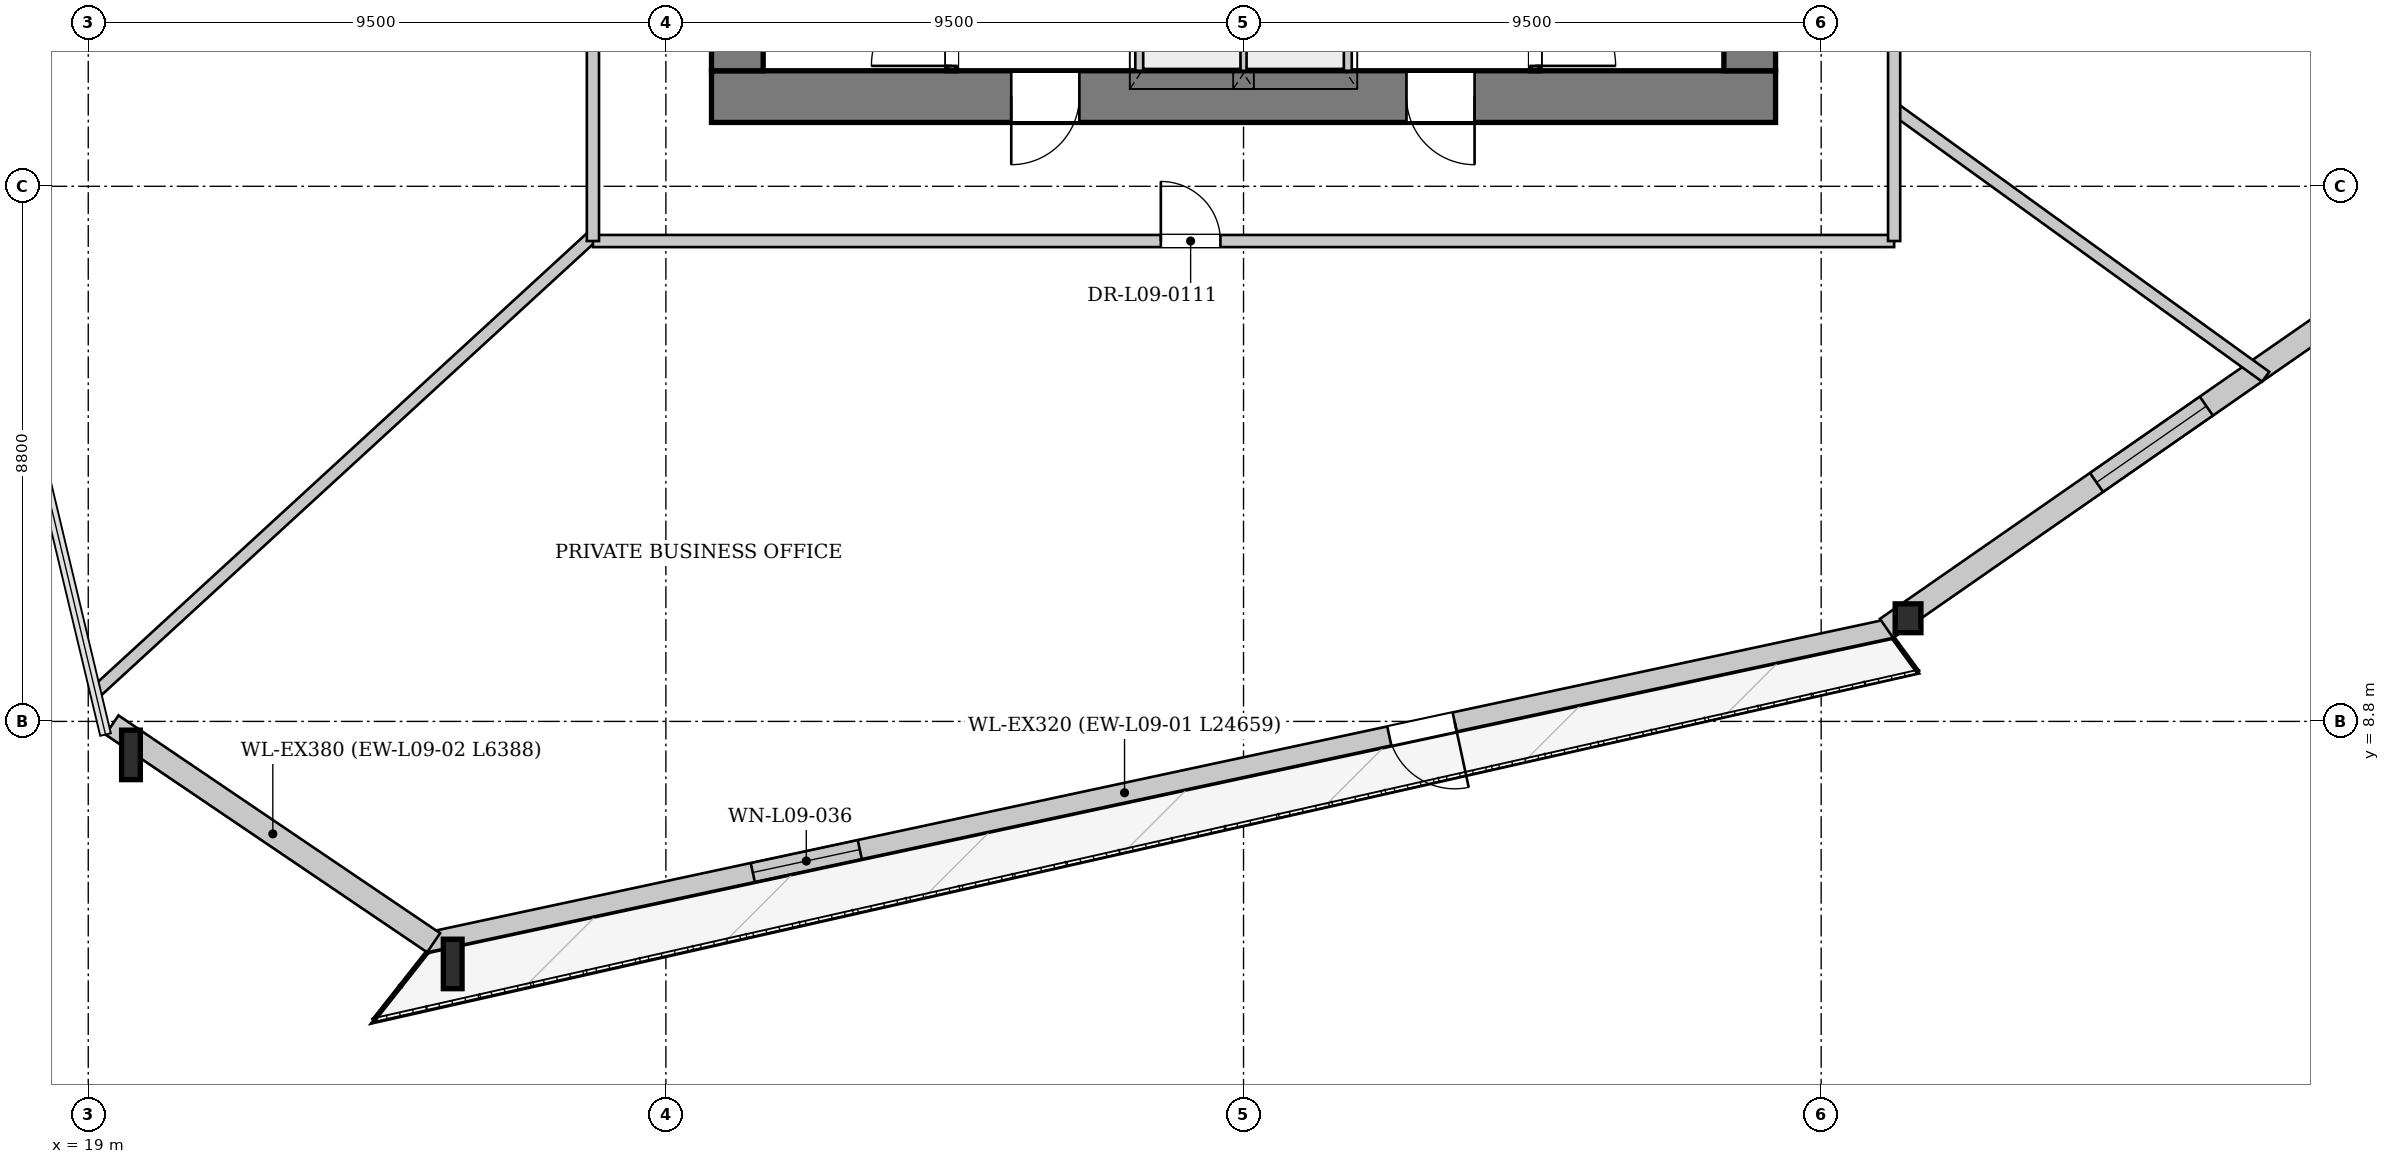
"""IFC4 building model, lengths in metres.
Left out: names, types, materials, properties, quantities, classifications, styles, units other than length and angle.
Written with IfcOpenShell. Run it as: python <this file> out.ifc"""

import sys

from ifc_helpers import new_model, si_unit, direction, frame, frame_2d, origin, origin_2d, place, context, subcontext, project, spatial, rectangle, i_section, extrude, source, transform, mapped, element, fill, save


model = new_model("IFC4")
c1 = context("Model", 3, precision=1e-05, world=origin(), true_north=direction((0.0, 1.0)))
c2 = subcontext(c1, "Body", "Model", "MODEL_VIEW")
j1 = project(units=[si_unit("LENGTHUNIT", "METRE"), si_unit("PLANEANGLEUNIT", "RADIAN")], contexts=[c1])
p1 = place(None, origin())
s1 = spatial("IfcSite", under=j1, at=p1, CompositionType="ELEMENT")
p2 = place(p1, origin())
s2 = spatial("IfcBuilding", under=s1, at=p2, CompositionType="ELEMENT")
p3 = place(p2, frame((0.0, 0.0, 39.95)))
s3 = spatial("IfcBuildingStorey", under=s2, at=p3, CompositionType="ELEMENT", Elevation=39.95)
m1 = source(origin(), c2, "Body", "SweptSolid", [
    extrude(i_section(OverallWidth=0.308, OverallDepth=0.814, WebThickness=0.021, FlangeThickness=0.04, at=origin_2d()), origin(), (0.0, 0.0, 1.0), 3.551),
])
p4 = place(p3, frame((19.284, 8.584, 0.0), z_axis=(0.235644751248, -0.188543305492, 0.953374518835), x_axis=(0.624750617891, 0.780824349931, 0.0)))
e1 = element("IfcColumn", 1, at=p4, inside=s3, PredefinedType="COLUMN", context=c2, shape_type="MappedRepresentation", body=[
    mapped(m1, transform((0.0, 0.0, 0.0), x_axis=(1.0, 0.0, 0.0), y_axis=(0.0, 1.0, 0.0), z_axis=(0.0, 0.0, 1.0), scale=1.0)),
])
m2 = source(origin(), c2, "Body", "SweptSolid", [
    extrude(i_section(OverallWidth=0.308, OverallDepth=0.814, WebThickness=0.021, FlangeThickness=0.04, at=origin_2d()), origin(), (0.0, 0.0, 1.0), 3.509),
])
p5 = place(p3, frame((24.574, 5.003, 0.0), z_axis=(0.239435581486, -0.109036778898, 0.964770222989), x_axis=(0.414440493718, 0.910076412817, 0.0)))
e2 = element("IfcColumn", 2, at=p5, inside=s3, PredefinedType="COLUMN", context=c2, shape_type="MappedRepresentation", body=[
    mapped(m2, transform((0.0, 0.0, 0.0), x_axis=(1.0, 0.0, 0.0), y_axis=(0.0, 1.0, 0.0), z_axis=(0.0, 0.0, 1.0), scale=1.0)),
])
m3 = source(origin(), c2, "Body", "SweptSolid", [
    extrude(i_section(OverallWidth=0.424, OverallDepth=0.474, WebThickness=0.043, FlangeThickness=0.068, at=origin_2d()), origin(), (0.0, 0.0, 1.0), 3.48),
])
p6 = place(p3, frame((48.684, 10.175, 0.0), z_axis=(0.140934148602, 0.184638466461, 0.972649064391), x_axis=(-0.79489758115, 0.60674363242, 0.0)))
e3 = element("IfcColumn", 3, at=p6, inside=s3, PredefinedType="COLUMN", context=c2, shape_type="MappedRepresentation", body=[
    mapped(m3, transform((0.0, 0.0, 0.0), x_axis=(1.0, 0.0, 0.0), y_axis=(0.0, 1.0, 0.0), z_axis=(0.0, 0.0, 1.0), scale=1.0)),
])
p7 = place(p3, frame((48.65, 10.331, 0.0), z_axis=(0.0, 0.0, 1.0), x_axis=(-0.977755300127, -0.209748833307, 0.0)))
e4 = element("IfcWall", 4, at=p7, inside=s3, PredefinedType="SOLIDWALL", context=c2, shape_type="SweptSolid", body=[
    extrude(rectangle(XDim=24.659, YDim=0.32, at=frame_2d((12.329, 0.0))), origin(), (0.0, 0.0, 1.0), 2.592),
])
p8 = place(p7, frame((7.341, 0.0, 0.0)))
e5 = element("IfcOpeningElement", 5, at=p8, cuts=e4, PredefinedType="OPENING", context=c2, shape_type="SweptSolid", body=[
    extrude(rectangle(XDim=1.1, YDim=2.3, at=frame_2d((0.55, 1.15))), frame((0.0, 0.17, 0.0), z_axis=(0.0, -1.0, 0.0), x_axis=(1.0, 0.0, 0.0)), (0.0, 0.0, 1.0), 0.34),
])
p9 = place(p7, frame((17.347, 0.0, 0.272)))
e6 = element("IfcOpeningElement", 6, at=p9, cuts=e4, PredefinedType="OPENING", context=c2, shape_type="SweptSolid", body=[
    extrude(rectangle(XDim=1.8, YDim=2.2, at=frame_2d((0.9, 1.1))), frame((0.0, 0.17, 0.0), z_axis=(0.0, -1.0, 0.0), x_axis=(1.0, 0.0, 0.0)), (0.0, 0.0, 1.0), 0.34),
])
p10 = place(p3, frame((24.68, 5.16, 0.0), z_axis=(0.0, 0.0, 1.0), x_axis=(-0.828077807829, 0.560613185878, 0.0)))
e7 = element("IfcWall", 7, at=p10, inside=s3, PredefinedType="SOLIDWALL", context=c2, shape_type="SweptSolid", body=[
    extrude(rectangle(XDim=6.388, YDim=0.38, at=frame_2d((3.194, 0.0))), origin(), (0.0, 0.0, 1.0), 2.592),
])
p11 = place(p3, frame((68.826, 24.401, 0.0), z_axis=(0.0, 0.0, 1.0), x_axis=(-0.821232588092, -0.570593582383, 0.0)))
e8 = element("IfcWall", 8, at=p11, inside=s3, PredefinedType="SOLIDWALL", context=c2, shape_type="SweptSolid", body=[
    extrude(rectangle(XDim=24.659, YDim=0.38, at=frame_2d((12.329, 0.0))), origin(), (0.0, 0.0, 1.0), 2.592),
])
p12 = place(p11, frame((5.804, 0.0, 0.222)))
e9 = element("IfcOpeningElement", 9, at=p12, cuts=e8, PredefinedType="OPENING", context=c2, shape_type="SweptSolid", body=[
    extrude(rectangle(XDim=2.2, YDim=2.25, at=frame_2d((1.1, 1.125))), frame((0.0, 0.2, 0.0), z_axis=(0.0, -1.0, 0.0), x_axis=(1.0, 0.0, 0.0)), (0.0, 0.0, 1.0), 0.4),
])
p13 = place(p11, frame((18.254, 0.0, 0.222)))
e10 = element("IfcOpeningElement", 10, at=p13, cuts=e8, PredefinedType="OPENING", context=c2, shape_type="SweptSolid", body=[
    extrude(rectangle(XDim=2.2, YDim=2.25, at=frame_2d((1.1, 1.125))), frame((0.0, 0.2, 0.0), z_axis=(0.0, -1.0, 0.0), x_axis=(1.0, 0.0, 0.0)), (0.0, 0.0, 1.0), 0.4),
])
p14 = place(p3, frame((46.75, 19.075, 0.0), z_axis=(0.0, 0.0, 1.0), x_axis=(-1.0, 0.0, 0.0)))
e11 = element("IfcWall", 11, at=p14, inside=s3, PredefinedType="SHEAR", context=c2, shape_type="SweptSolid", body=[
    extrude(rectangle(XDim=17.5, YDim=0.85, at=frame_2d((8.75, 0.0))), origin(), (0.0, 0.0, 1.0), 3.3),
])
p15 = place(p14, frame((4.95, 0.0, 0.0)))
e12 = element("IfcOpeningElement", 12, at=p15, cuts=e11, PredefinedType="OPENING", context=c2, shape_type="SweptSolid", body=[
    extrude(rectangle(XDim=1.12, YDim=2.25, at=frame_2d((0.56, 1.125))), frame((0.0, 0.435, 0.0), z_axis=(0.0, -1.0, 0.0), x_axis=(1.0, 0.0, 0.0)), (0.0, 0.0, 1.0), 0.87),
])
p16 = place(p14, frame((11.45, 0.0, 0.0)))
e13 = element("IfcOpeningElement", 13, at=p16, cuts=e11, PredefinedType="OPENING", context=c2, shape_type="SweptSolid", body=[
    extrude(rectangle(XDim=1.12, YDim=2.25, at=frame_2d((0.56, 1.125))), frame((0.0, 0.435, 0.0), z_axis=(0.0, -1.0, 0.0), x_axis=(1.0, 0.0, 0.0)), (0.0, 0.0, 1.0), 0.87),
])
p17 = place(p3, frame((29.675, 19.5, 0.0), z_axis=(0.0, 0.0, 1.0), x_axis=(0.0, 1.0, 0.0)))
e14 = element("IfcWall", 14, at=p17, inside=s3, PredefinedType="SHEAR", context=c2, shape_type="SweptSolid", body=[
    extrude(rectangle(XDim=14.2, YDim=0.85, at=frame_2d((7.1, 0.0))), origin(), (0.0, 0.0, 1.0), 3.3),
])
p18 = place(p17, frame((7.42, 0.0, 0.0)))
e15 = element("IfcOpeningElement", 15, at=p18, cuts=e14, PredefinedType="OPENING", context=c2, shape_type="SweptSolid", body=[
    extrude(rectangle(XDim=1.6, YDim=2.2, at=frame_2d((0.8, 1.1))), frame((0.0, 0.435, 0.0), z_axis=(0.0, -1.0, 0.0), x_axis=(1.0, 0.0, 0.0)), (0.0, 0.0, 1.0), 0.87),
])
p19 = place(p3, frame((46.325, 33.7, 0.0), z_axis=(0.0, 0.0, 1.0), x_axis=(0.0, -1.0, 0.0)))
e16 = element("IfcWall", 16, at=p19, inside=s3, PredefinedType="SHEAR", context=c2, shape_type="SweptSolid", body=[
    extrude(rectangle(XDim=14.2, YDim=0.85, at=frame_2d((7.1, 0.0))), origin(), (0.0, 0.0, 1.0), 3.3),
])
p20 = place(p19, frame((5.18, 0.0, 0.0)))
e17 = element("IfcOpeningElement", 17, at=p20, cuts=e16, PredefinedType="OPENING", context=c2, shape_type="SweptSolid", body=[
    extrude(rectangle(XDim=1.6, YDim=2.2, at=frame_2d((0.8, 1.1))), frame((0.0, 0.435, 0.0), z_axis=(0.0, -1.0, 0.0), x_axis=(1.0, 0.0, 0.0)), (0.0, 0.0, 1.0), 0.87),
])
p21 = place(p3, frame((33.2, 19.5, 0.0), z_axis=(0.0, 0.0, 1.0), x_axis=(0.0, 1.0, 0.0)))
e18 = element("IfcWall", 18, at=p21, inside=s3, PredefinedType="PARTITIONING", context=c2, shape_type="SweptSolid", body=[
    extrude(rectangle(XDim=7.46, YDim=0.16, at=frame_2d((3.73, 0.0))), origin(), (0.0, 0.0, 1.0), 3.3),
])
p22 = place(p21, frame((0.08, 0.0, 0.0)))
e19 = element("IfcOpeningElement", 19, at=p22, cuts=e18, PredefinedType="OPENING", context=c2, shape_type="SweptSolid", body=[
    extrude(rectangle(XDim=1.32, YDim=2.2, at=frame_2d((0.66, 1.1))), frame((0.0, 0.09, 0.0), z_axis=(0.0, -1.0, 0.0), x_axis=(1.0, 0.0, 0.0)), (0.0, 0.0, 1.0), 0.18),
])
p23 = place(p3, frame((42.8, 26.96, 0.0), z_axis=(0.0, 0.0, 1.0), x_axis=(0.0, -1.0, 0.0)))
e20 = element("IfcWall", 20, at=p23, inside=s3, PredefinedType="PARTITIONING", context=c2, shape_type="SweptSolid", body=[
    extrude(rectangle(XDim=7.46, YDim=0.16, at=frame_2d((3.73, 0.0))), origin(), (0.0, 0.0, 1.0), 3.3),
])
p24 = place(p23, frame((6.06, 0.0, 0.0)))
e21 = element("IfcOpeningElement", 21, at=p24, cuts=e20, PredefinedType="OPENING", context=c2, shape_type="SweptSolid", body=[
    extrude(rectangle(XDim=1.32, YDim=2.2, at=frame_2d((0.66, 1.1))), frame((0.0, 0.09, 0.0), z_axis=(0.0, -1.0, 0.0), x_axis=(1.0, 0.0, 0.0)), (0.0, 0.0, 1.0), 0.18),
])
p25 = place(p3, frame((36.3, 19.5, 0.0), z_axis=(0.0, 0.0, 1.0), x_axis=(0.0, 1.0, 0.0)))
e22 = element("IfcWall", 22, at=p25, inside=s3, PredefinedType="PARTITIONING", context=c2, shape_type="SweptSolid", body=[
    extrude(rectangle(XDim=4.78, YDim=0.16, at=frame_2d((2.39, 0.0))), origin(), (0.0, 0.0, 1.0), 3.3),
])
p26 = place(p25, frame((0.6, 0.0, 0.0)))
e23 = element("IfcOpeningElement", 23, at=p26, cuts=e22, PredefinedType="OPENING", context=c2, shape_type="SweptSolid", body=[
    extrude(rectangle(XDim=1.2, YDim=2.2, at=frame_2d((0.6, 1.1))), frame((0.0, 0.09, 0.0), z_axis=(0.0, -1.0, 0.0), x_axis=(1.0, 0.0, 0.0)), (0.0, 0.0, 1.0), 0.18),
])
p27 = place(p25, frame((2.65, 0.0, 0.0)))
e24 = element("IfcOpeningElement", 24, at=p27, cuts=e22, PredefinedType="OPENING", context=c2, shape_type="SweptSolid", body=[
    extrude(rectangle(XDim=0.95, YDim=2.1, at=frame_2d((0.475, 1.05))), frame((0.0, 0.09, 0.0), z_axis=(0.0, -1.0, 0.0), x_axis=(1.0, 0.0, 0.0)), (0.0, 0.0, 1.0), 0.18),
])
p28 = place(p3, frame((39.7, 24.28, 0.0), z_axis=(0.0, 0.0, 1.0), x_axis=(0.0, -1.0, 0.0)))
e25 = element("IfcWall", 25, at=p28, inside=s3, PredefinedType="PARTITIONING", context=c2, shape_type="SweptSolid", body=[
    extrude(rectangle(XDim=4.78, YDim=0.16, at=frame_2d((2.39, 0.0))), origin(), (0.0, 0.0, 1.0), 3.3),
])
p29 = place(p28, frame((3.12, 0.0, 0.0)))
e26 = element("IfcOpeningElement", 26, at=p29, cuts=e25, PredefinedType="OPENING", context=c2, shape_type="SweptSolid", body=[
    extrude(rectangle(XDim=1.2, YDim=2.2, at=frame_2d((0.6, 1.1))), frame((0.0, 0.09, 0.0), z_axis=(0.0, -1.0, 0.0), x_axis=(1.0, 0.0, 0.0)), (0.0, 0.0, 1.0), 0.18),
])
p30 = place(p3, frame((38.0, 19.5, 0.0), z_axis=(0.0, 0.0, 1.0), x_axis=(0.0, 1.0, 0.0)))
e27 = element("IfcWall", 27, at=p30, inside=s3, PredefinedType="PARTITIONING", context=c2, shape_type="SweptSolid", body=[
    extrude(rectangle(XDim=2.46, YDim=0.125, at=frame_2d((1.23, 0.0))), origin(), (0.0, 0.0, 1.0), 3.3),
])
p31 = place(p3, frame((27.3, 16.783, 0.0), z_axis=(0.0, 0.0, 1.0), x_axis=(-0.73685833928, -0.676047178703, 0.0)))
e28 = element("IfcWall", 28, at=p31, inside=s3, PredefinedType="PARTITIONING", context=c2, shape_type="SweptSolid", body=[
    extrude(rectangle(XDim=11.069, YDim=0.2, at=frame_2d((5.534, 0.0))), origin(), (0.0, 0.0, 1.0), 3.3),
])
p32 = place(p3, frame((48.7, 18.878, 0.0), z_axis=(0.0, 0.0, 1.0), x_axis=(0.810875678149, -0.585218450312, 0.0)))
e29 = element("IfcWall", 29, at=p32, inside=s3, PredefinedType="PARTITIONING", context=c2, shape_type="SweptSolid", body=[
    extrude(rectangle(XDim=7.535, YDim=0.2, at=frame_2d((3.768, 0.0))), origin(), (0.0, 0.0, 1.0), 3.3),
])
p33 = place(p3, frame((27.3, 16.7, 0.0), z_axis=(0.0, 0.0, 1.0), x_axis=(1.0, 0.0, 0.0)))
e30 = element("IfcWall", 30, at=p33, inside=s3, PredefinedType="PARTITIONING", context=c2, shape_type="SweptSolid", body=[
    extrude(rectangle(XDim=21.4, YDim=0.2, at=frame_2d((10.7, 0.0))), origin(), (0.0, 0.0, 1.0), 3.3),
])
p34 = place(p33, frame((9.34, 0.0, 0.0)))
e31 = element("IfcOpeningElement", 31, at=p34, cuts=e30, PredefinedType="OPENING", context=c2, shape_type="SweptSolid", body=[
    extrude(rectangle(XDim=0.98, YDim=2.15, at=frame_2d((0.49, 1.075))), frame((0.0, 0.11, 0.0), z_axis=(0.0, -1.0, 0.0), x_axis=(1.0, 0.0, 0.0)), (0.0, 0.0, 1.0), 0.22),
])
p35 = place(p3, frame((27.3, 16.7, 0.0), z_axis=(0.0, 0.0, 1.0), x_axis=(0.0, 1.0, 0.0)))
e32 = element("IfcWall", 32, at=p35, inside=s3, PredefinedType="PARTITIONING", context=c2, shape_type="SweptSolid", body=[
    extrude(rectangle(XDim=19.8, YDim=0.2, at=frame_2d((9.9, 0.0))), origin(), (0.0, 0.0, 1.0), 3.3),
])
p36 = place(p35, frame((18.52, 0.0, 0.0)))
e33 = element("IfcOpeningElement", 33, at=p36, cuts=e32, PredefinedType="OPENING", context=c2, shape_type="SweptSolid", body=[
    extrude(rectangle(XDim=0.98, YDim=2.15, at=frame_2d((0.49, 1.075))), frame((0.0, 0.11, 0.0), z_axis=(0.0, -1.0, 0.0), x_axis=(1.0, 0.0, 0.0)), (0.0, 0.0, 1.0), 0.22),
])
p37 = place(p35, frame((4.521, 0.0, 0.0)))
e34 = element("IfcOpeningElement", 34, at=p37, cuts=e32, PredefinedType="OPENING", context=c2, shape_type="SweptSolid", body=[
    extrude(rectangle(XDim=0.98, YDim=2.15, at=frame_2d((0.49, 1.075))), frame((0.0, 0.11, 0.0), z_axis=(0.0, -1.0, 0.0), x_axis=(1.0, 0.0, 0.0)), (0.0, 0.0, 1.0), 0.22),
])
p38 = place(p3, frame((48.7, 16.7, 0.0), z_axis=(0.0, 0.0, 1.0), x_axis=(0.0, 1.0, 0.0)))
e35 = element("IfcWall", 35, at=p38, inside=s3, PredefinedType="PARTITIONING", context=c2, shape_type="SweptSolid", body=[
    extrude(rectangle(XDim=19.8, YDim=0.2, at=frame_2d((9.9, 0.0))), origin(), (0.0, 0.0, 1.0), 3.3),
])
p39 = place(p38, frame((4.431, 0.0, 0.0)))
e36 = element("IfcOpeningElement", 36, at=p39, cuts=e35, PredefinedType="OPENING", context=c2, shape_type="SweptSolid", body=[
    extrude(rectangle(XDim=0.98, YDim=2.15, at=frame_2d((0.49, 1.075))), frame((0.0, 0.11, 0.0), z_axis=(0.0, -1.0, 0.0), x_axis=(1.0, 0.0, 0.0)), (0.0, 0.0, 1.0), 0.22),
])
m4 = source(origin(), c2, "Body", "SweptSolid", [
    extrude(rectangle(XDim=1.1, YDim=2.3, at=frame_2d((0.55, 1.15))), frame((0.0, 0.025, 0.0), z_axis=(0.0, -1.0, 0.0), x_axis=(1.0, 0.0, 0.0)), (0.0, 0.0, 1.0), 0.05),
])
p40 = place(p8, origin())
e37 = element("IfcDoor", 37, at=p40, inside=s3, OperationType="SINGLE_SWING_LEFT", PredefinedType="DOOR", context=c2, shape_type="MappedRepresentation", body=[
    mapped(m4, transform((0.0, 0.0, 0.0), x_axis=(1.0, 0.0, 0.0), y_axis=(0.0, 1.0, 0.0), z_axis=(0.0, 0.0, 1.0), scale=1.0)),
])
fill(e5, e37)
m5 = source(origin(), c2, "Body", "SweptSolid", [
    extrude(rectangle(XDim=1.8, YDim=2.2, at=frame_2d((0.9, 1.1))), frame((0.0, 0.03, 0.0), z_axis=(0.0, -1.0, 0.0), x_axis=(1.0, 0.0, 0.0)), (0.0, 0.0, 1.0), 0.06),
])
p41 = place(p9, origin())
e38 = element("IfcWindow", 38, at=p41, inside=s3, PartitioningType="SINGLE_PANEL", PredefinedType="WINDOW", context=c2, shape_type="MappedRepresentation", body=[
    mapped(m5, transform((0.0, 0.0, 0.0), x_axis=(1.0, 0.0, 0.0), y_axis=(0.0, 1.0, 0.0), z_axis=(0.0, 0.0, 1.0), scale=1.0)),
])
fill(e6, e38)
m6 = source(origin(), c2, "Body", "SweptSolid", [
    extrude(rectangle(XDim=2.2, YDim=2.25, at=frame_2d((1.1, 1.125))), frame((0.0, 0.03, 0.0), z_axis=(0.0, -1.0, 0.0), x_axis=(1.0, 0.0, 0.0)), (0.0, 0.0, 1.0), 0.06),
])
p42 = place(p13, origin())
e39 = element("IfcWindow", 39, at=p42, inside=s3, PartitioningType="SINGLE_PANEL", PredefinedType="WINDOW", context=c2, shape_type="MappedRepresentation", body=[
    mapped(m6, transform((0.0, 0.0, 0.0), x_axis=(1.0, 0.0, 0.0), y_axis=(0.0, 1.0, 0.0), z_axis=(0.0, 0.0, 1.0), scale=1.0)),
])
fill(e10, e39)
m7 = source(origin(), c2, "Body", "SweptSolid", [
    extrude(rectangle(XDim=1.12, YDim=2.25, at=frame_2d((0.56, 1.125))), frame((0.0, 0.025, 0.0), z_axis=(0.0, -1.0, 0.0), x_axis=(1.0, 0.0, 0.0)), (0.0, 0.0, 1.0), 0.05),
])
p43 = place(p15, origin())
e40 = element("IfcDoor", 40, at=p43, inside=s3, OperationType="SINGLE_SWING_LEFT", PredefinedType="DOOR", context=c2, shape_type="MappedRepresentation", body=[
    mapped(m7, transform((0.0, 0.0, 0.0), x_axis=(1.0, 0.0, 0.0), y_axis=(0.0, 1.0, 0.0), z_axis=(0.0, 0.0, 1.0), scale=1.0)),
])
fill(e12, e40)
p44 = place(p16, origin())
e41 = element("IfcDoor", 41, at=p44, inside=s3, OperationType="SINGLE_SWING_RIGHT", PredefinedType="DOOR", context=c2, shape_type="MappedRepresentation", body=[
    mapped(m7, transform((0.0, 0.0, 0.0), x_axis=(1.0, 0.0, 0.0), y_axis=(0.0, 1.0, 0.0), z_axis=(0.0, 0.0, 1.0), scale=1.0)),
])
fill(e13, e41)
m8 = source(origin(), c2, "Body", "SweptSolid", [
    extrude(rectangle(XDim=1.32, YDim=2.2, at=frame_2d((0.66, 1.1))), frame((0.0, 0.025, 0.0), z_axis=(0.0, -1.0, 0.0), x_axis=(1.0, 0.0, 0.0)), (0.0, 0.0, 1.0), 0.05),
])
p45 = place(p22, origin())
e42 = element("IfcDoor", 42, at=p45, inside=s3, OperationType="SINGLE_SWING_LEFT", PredefinedType="DOOR", context=c2, shape_type="MappedRepresentation", body=[
    mapped(m8, transform((0.0, 0.0, 0.0), x_axis=(1.0, 0.0, 0.0), y_axis=(0.0, 1.0, 0.0), z_axis=(0.0, 0.0, 1.0), scale=1.0)),
])
fill(e19, e42)
p46 = place(p24, origin())
e43 = element("IfcDoor", 43, at=p46, inside=s3, OperationType="SINGLE_SWING_RIGHT", PredefinedType="DOOR", context=c2, shape_type="MappedRepresentation", body=[
    mapped(m8, transform((0.0, 0.0, 0.0), x_axis=(1.0, 0.0, 0.0), y_axis=(0.0, 1.0, 0.0), z_axis=(0.0, 0.0, 1.0), scale=1.0)),
])
fill(e21, e43)
m9 = source(origin(), c2, "Body", "SweptSolid", [
    extrude(rectangle(XDim=0.98, YDim=2.15, at=frame_2d((0.49, 1.075))), frame((0.0, 0.025, 0.0), z_axis=(0.0, -1.0, 0.0), x_axis=(1.0, 0.0, 0.0)), (0.0, 0.0, 1.0), 0.05),
])
p47 = place(p34, origin())
e44 = element("IfcDoor", 44, at=p47, inside=s3, OperationType="SINGLE_SWING_LEFT", PredefinedType="DOOR", context=c2, shape_type="MappedRepresentation", body=[
    mapped(m9, transform((0.0, 0.0, 0.0), x_axis=(1.0, 0.0, 0.0), y_axis=(0.0, 1.0, 0.0), z_axis=(0.0, 0.0, 1.0), scale=1.0)),
])
fill(e31, e44)
save(model, sys.argv[1])
